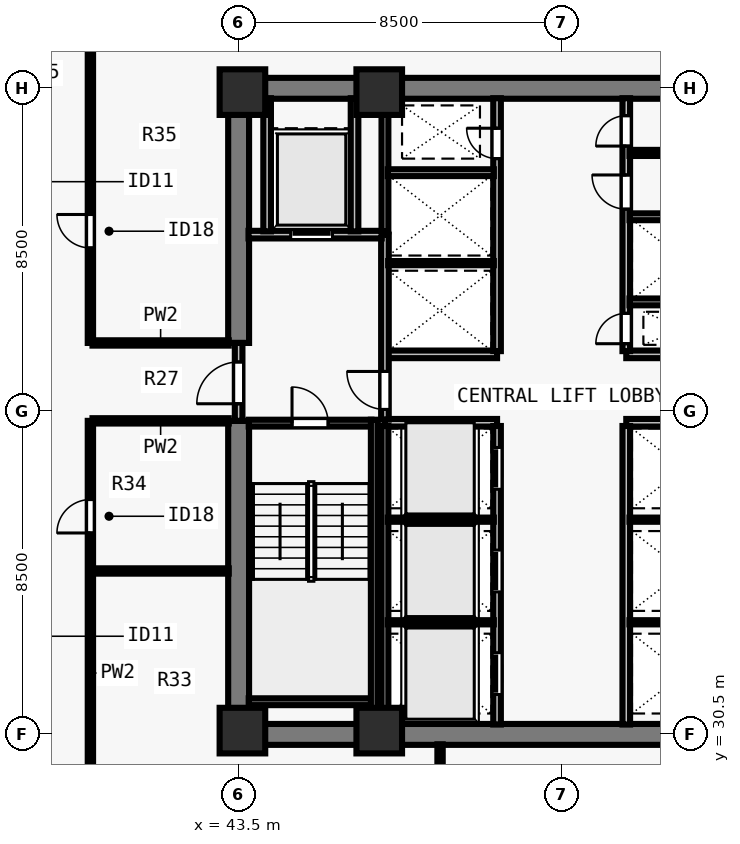
"""IFC4 building model, lengths in metres.
Left out: names, types, materials, properties, quantities, classifications, styles, units other than length and angle.
Written with IfcOpenShell. Run it as: python <this file> out.ifc"""

import sys

from ifc_helpers import new_model, si_unit, direction, frame, frame_2d, origin, origin_2d, place, context, subcontext, project, spatial, rectangle, extrude, element, fill, save


model = new_model("IFC4")
c1 = context("Model", 3, precision=1e-05, world=origin(), true_north=direction((0.0, 1.0)))
c2 = subcontext(c1, "Body", "Model", "MODEL_VIEW")
j1 = project(units=[si_unit("LENGTHUNIT", "METRE"), si_unit("PLANEANGLEUNIT", "RADIAN")], contexts=[c1])
p1 = place(None, origin())
s1 = spatial("IfcSite", under=j1, at=p1, CompositionType="ELEMENT")
p2 = place(p1, origin())
s2 = spatial("IfcBuilding", under=s1, at=p2, CompositionType="ELEMENT")
p3 = place(p2, frame((0.0, 0.0, 55.0)))
s3 = spatial("IfcBuildingStorey", under=s2, at=p3, CompositionType="ELEMENT", Elevation=55.0)
for number, where, z_axis, x_axis in (
    (1, (43.6, 30.6, 0.0), (0.0, 0.0, 1.0), (1.0, 0.0, 0.0)),
    (2, (47.2, 30.6, 0.0), (0.0, 0.0, 1.0), (1.0, 0.0, 0.0)),
    (3, (43.6, 47.4, 0.0), (0.0, 0.0, 1.0), (1.0, 0.0, 0.0)),
    (4, (47.2, 47.4, 0.0), (0.0, 0.0, 1.0), (1.0, 0.0, 0.0)),
):
    element("IfcColumn", number, at=place(p3, frame(where, z_axis=z_axis, x_axis=x_axis)), inside=s3, PredefinedType="COLUMN", context=c2, shape_type="SweptSolid", body=[
        extrude(rectangle(XDim=1.2, YDim=1.2, at=origin_2d()), origin(), (0.0, 0.0, 1.0), 3.5),
    ])
for number, where, z_axis, x_axis in (
    (5, (43.225, 30.5, 0.0), (0.0, 0.0, 1.0), (1.0, 0.0, 0.0)),
    (6, (43.225, 47.5, 0.0), (0.0, 0.0, 1.0), (1.0, 0.0, 0.0)),
):
    element("IfcWall", number, at=place(p3, frame(where, z_axis=z_axis, x_axis=x_axis)), inside=s3, PredefinedType="SHEAR", context=c2, shape_type="SweptSolid", body=[
        extrude(rectangle(XDim=17.55, YDim=0.55, at=frame_2d((8.775, 0.0))), origin(), (0.0, 0.0, 1.0), 3.28),
    ])
p4 = place(p3, frame((43.5, 30.765, 0.0), z_axis=(0.0, 0.0, 1.0), x_axis=(0.0, 1.0, 0.0)))
e7 = element("IfcWall", 7, at=p4, inside=s3, PredefinedType="SHEAR", context=c2, shape_type="SweptSolid", body=[
    extrude(rectangle(XDim=7.985, YDim=0.55, at=frame_2d((3.993, 0.0))), origin(), (0.0, 0.0, 1.0), 3.28),
])
p5 = place(p3, frame((43.5, 40.8, 0.0), z_axis=(0.0, 0.0, 1.0), x_axis=(0.0, 1.0, 0.0)))
e8 = element("IfcWall", 8, at=p5, inside=s3, PredefinedType="SHEAR", context=c2, shape_type="SweptSolid", body=[
    extrude(rectangle(XDim=6.435, YDim=0.55, at=frame_2d((3.218, 0.0))), origin(), (0.0, 0.0, 1.0), 3.28),
])
for number, where, z_axis, x_axis in (
    (9, (47.35, 38.7, 0.0), (0.0, 0.0, 1.0), (1.0, 0.0, 0.0)),
    (10, (47.35, 40.5, 0.0), (0.0, 0.0, 1.0), (1.0, 0.0, 0.0)),
    (11, (53.7, 38.7, 0.0), (0.0, 0.0, 1.0), (1.0, 0.0, 0.0)),
    (12, (53.7, 40.5, 0.0), (0.0, 0.0, 1.0), (1.0, 0.0, 0.0)),
):
    element("IfcWall", number, at=place(p3, frame(where, z_axis=z_axis, x_axis=x_axis)), inside=s3, PredefinedType="SOLIDWALL", context=c2, shape_type="SweptSolid", body=[
        extrude(rectangle(XDim=2.95, YDim=0.2, at=frame_2d((1.475, 0.0))), origin(), (0.0, 0.0, 1.0), 3.28),
    ])
p6 = place(p3, frame((50.3, 30.76, 0.0), z_axis=(0.0, 0.0, 1.0), x_axis=(0.0, 1.0, 0.0)))
e13 = element("IfcWall", 13, at=p6, inside=s3, PredefinedType="SOLIDWALL", context=c2, shape_type="SweptSolid", body=[
    extrude(rectangle(XDim=7.855, YDim=0.2, at=frame_2d((3.927, 0.0))), origin(), (0.0, 0.0, 1.0), 3.28),
])
p7 = place(p6, frame((0.79, 0.0, 0.0)))
e14 = element("IfcOpeningElement", 14, at=p7, cuts=e13, PredefinedType="OPENING", context=c2, shape_type="SweptSolid", body=[
    extrude(rectangle(XDim=1.1, YDim=2.2, at=frame_2d((0.55, 1.1))), frame((0.0, 0.11, 0.0), z_axis=(0.0, -1.0, 0.0), x_axis=(1.0, 0.0, 0.0)), (0.0, 0.0, 1.0), 0.22),
])
p8 = place(p6, frame((3.49, 0.0, 0.0)))
e15 = element("IfcOpeningElement", 15, at=p8, cuts=e13, PredefinedType="OPENING", context=c2, shape_type="SweptSolid", body=[
    extrude(rectangle(XDim=1.1, YDim=2.2, at=frame_2d((0.55, 1.1))), frame((0.0, 0.11, 0.0), z_axis=(0.0, -1.0, 0.0), x_axis=(1.0, 0.0, 0.0)), (0.0, 0.0, 1.0), 0.22),
])
p9 = place(p6, frame((6.19, 0.0, 0.0)))
e16 = element("IfcOpeningElement", 16, at=p9, cuts=e13, PredefinedType="OPENING", context=c2, shape_type="SweptSolid", body=[
    extrude(rectangle(XDim=1.1, YDim=2.2, at=frame_2d((0.55, 1.1))), frame((0.0, 0.11, 0.0), z_axis=(0.0, -1.0, 0.0), x_axis=(1.0, 0.0, 0.0)), (0.0, 0.0, 1.0), 0.22),
])
p10 = place(p3, frame((53.7, 30.76, 0.0), z_axis=(0.0, 0.0, 1.0), x_axis=(0.0, 1.0, 0.0)))
e17 = element("IfcWall", 17, at=p10, inside=s3, PredefinedType="SOLIDWALL", context=c2, shape_type="SweptSolid", body=[
    extrude(rectangle(XDim=7.855, YDim=0.2, at=frame_2d((3.927, 0.0))), origin(), (0.0, 0.0, 1.0), 3.28),
])
p11 = place(p3, frame((50.3, 40.585, 0.0), z_axis=(0.0, 0.0, 1.0), x_axis=(0.0, 1.0, 0.0)))
e18 = element("IfcWall", 18, at=p11, inside=s3, PredefinedType="SOLIDWALL", context=c2, shape_type="SweptSolid", body=[
    extrude(rectangle(XDim=6.655, YDim=0.2, at=frame_2d((3.328, 0.0))), origin(), (0.0, 0.0, 1.0), 3.28),
])
p12 = place(p11, frame((5.065, 0.0, 0.0)))
e19 = element("IfcOpeningElement", 19, at=p12, cuts=e18, PredefinedType="OPENING", context=c2, shape_type="SweptSolid", body=[
    extrude(rectangle(XDim=0.8, YDim=2.08, at=frame_2d((0.4, 1.04))), frame((0.0, 0.11, 0.0), z_axis=(0.0, -1.0, 0.0), x_axis=(1.0, 0.0, 0.0)), (0.0, 0.0, 1.0), 0.22),
])
p13 = place(p3, frame((53.7, 40.585, 0.0), z_axis=(0.0, 0.0, 1.0), x_axis=(0.0, 1.0, 0.0)))
e20 = element("IfcWall", 20, at=p13, inside=s3, PredefinedType="SOLIDWALL", context=c2, shape_type="SweptSolid", body=[
    extrude(rectangle(XDim=6.655, YDim=0.2, at=frame_2d((3.328, 0.0))), origin(), (0.0, 0.0, 1.0), 3.28),
])
p14 = place(p13, frame((0.195, 0.0, 0.0)))
e21 = element("IfcOpeningElement", 21, at=p14, cuts=e20, PredefinedType="OPENING", context=c2, shape_type="SweptSolid", body=[
    extrude(rectangle(XDim=0.8, YDim=2.08, at=frame_2d((0.4, 1.04))), frame((0.0, 0.11, 0.0), z_axis=(0.0, -1.0, 0.0), x_axis=(1.0, 0.0, 0.0)), (0.0, 0.0, 1.0), 0.22),
])
p15 = place(p13, frame((3.735, 0.0, 0.0)))
e22 = element("IfcOpeningElement", 22, at=p15, cuts=e20, PredefinedType="OPENING", context=c2, shape_type="SweptSolid", body=[
    extrude(rectangle(XDim=0.9, YDim=2.12, at=frame_2d((0.45, 1.06))), frame((0.0, 0.11, 0.0), z_axis=(0.0, -1.0, 0.0), x_axis=(1.0, 0.0, 0.0)), (0.0, 0.0, 1.0), 0.22),
])
p16 = place(p13, frame((5.395, 0.0, 0.0)))
e23 = element("IfcOpeningElement", 23, at=p16, cuts=e20, PredefinedType="OPENING", context=c2, shape_type="SweptSolid", body=[
    extrude(rectangle(XDim=0.8, YDim=2.1, at=frame_2d((0.4, 1.05))), frame((0.0, 0.11, 0.0), z_axis=(0.0, -1.0, 0.0), x_axis=(1.0, 0.0, 0.0)), (0.0, 0.0, 1.0), 0.22),
])
p17 = place(p3, frame((43.5, 38.75, 0.0), z_axis=(0.0, 0.0, 1.0), x_axis=(0.0, 1.0, 0.0)))
e24 = element("IfcWall", 24, at=p17, inside=s3, PredefinedType="SOLIDWALL", context=c2, shape_type="SweptSolid", body=[
    extrude(rectangle(XDim=2.05, YDim=0.2, at=frame_2d((1.025, 0.0))), origin(), (0.0, 0.0, 1.0), 3.28),
])
p18 = place(p17, frame((0.45, 0.0, 0.0)))
e25 = element("IfcOpeningElement", 25, at=p18, cuts=e24, PredefinedType="OPENING", context=c2, shape_type="SweptSolid", body=[
    extrude(rectangle(XDim=1.1, YDim=2.15, at=frame_2d((0.55, 1.075))), frame((0.0, 0.11, 0.0), z_axis=(0.0, -1.0, 0.0), x_axis=(1.0, 0.0, 0.0)), (0.0, 0.0, 1.0), 0.22),
])
p19 = place(p3, frame((47.35, 38.785, 0.0), z_axis=(0.0, 0.0, 1.0), x_axis=(0.0, 1.0, 0.0)))
e26 = element("IfcWall", 26, at=p19, inside=s3, PredefinedType="SOLIDWALL", context=c2, shape_type="SweptSolid", body=[
    extrude(rectangle(XDim=4.865, YDim=0.2, at=frame_2d((2.433, 0.0))), origin(), (0.0, 0.0, 1.0), 3.28),
])
p20 = place(p19, frame((0.265, 0.0, 0.0)))
e27 = element("IfcOpeningElement", 27, at=p20, cuts=e26, PredefinedType="OPENING", context=c2, shape_type="SweptSolid", body=[
    extrude(rectangle(XDim=1.0, YDim=2.15, at=frame_2d((0.5, 1.075))), frame((0.0, 0.11, 0.0), z_axis=(0.0, -1.0, 0.0), x_axis=(1.0, 0.0, 0.0)), (0.0, 0.0, 1.0), 0.22),
])
p21 = place(p3, frame((43.76, 43.65, 0.0), z_axis=(0.0, 0.0, 1.0), x_axis=(1.0, 0.0, 0.0)))
e28 = element("IfcWall", 28, at=p21, inside=s3, PredefinedType="SOLIDWALL", context=c2, shape_type="SweptSolid", body=[
    extrude(rectangle(XDim=3.505, YDim=0.2, at=frame_2d((1.752, 0.0))), origin(), (0.0, 0.0, 1.0), 3.28),
])
p22 = place(p21, frame((1.11, 0.0, 0.0)))
e29 = element("IfcOpeningElement", 29, at=p22, cuts=e28, PredefinedType="OPENING", context=c2, shape_type="SweptSolid", body=[
    extrude(rectangle(XDim=1.1, YDim=2.2, at=frame_2d((0.55, 1.1))), frame((0.0, 0.11, 0.0), z_axis=(0.0, -1.0, 0.0), x_axis=(1.0, 0.0, 0.0)), (0.0, 0.0, 1.0), 0.22),
])
for number, where, z_axis, x_axis in (
    (30, (46.55, 43.735, 0.0), (0.0, 0.0, 1.0), (0.0, 1.0, 0.0)),
    (31, (44.25, 43.735, 0.0), (0.0, 0.0, 1.0), (0.0, 1.0, 0.0)),
):
    element("IfcWall", number, at=place(p3, frame(where, z_axis=z_axis, x_axis=x_axis)), inside=s3, PredefinedType="SOLIDWALL", context=c2, shape_type="SweptSolid", body=[
        extrude(rectangle(XDim=3.505, YDim=0.2, at=frame_2d((1.752, 0.0))), origin(), (0.0, 0.0, 1.0), 3.28),
    ])
p23 = place(p3, frame((47.35, 30.76, 0.0), z_axis=(0.0, 0.0, 1.0), x_axis=(0.0, 1.0, 0.0)))
e32 = element("IfcWall", 32, at=p23, inside=s3, PredefinedType="SOLIDWALL", context=c2, shape_type="SweptSolid", body=[
    extrude(rectangle(XDim=7.855, YDim=0.18, at=frame_2d((3.927, 0.0))), origin(), (0.0, 0.0, 1.0), 3.28),
])
for number, where, z_axis, x_axis in (
    (33, (47.425, 33.45, 0.0), (0.0, 0.0, 1.0), (1.0, 0.0, 0.0)),
    (34, (47.425, 36.15, 0.0), (0.0, 0.0, 1.0), (1.0, 0.0, 0.0)),
    (35, (53.785, 33.45, 0.0), (0.0, 0.0, 1.0), (1.0, 0.0, 0.0)),
    (36, (53.785, 36.15, 0.0), (0.0, 0.0, 1.0), (1.0, 0.0, 0.0)),
):
    element("IfcWall", number, at=place(p3, frame(where, z_axis=z_axis, x_axis=x_axis)), inside=s3, PredefinedType="PARTITIONING", context=c2, shape_type="SweptSolid", body=[
        extrude(rectangle(XDim=2.79, YDim=0.11, at=frame_2d((1.395, 0.0))), origin(), (0.0, 0.0, 1.0), 3.28),
    ])
p24 = place(p3, frame((47.35, 43.735, 0.0), z_axis=(0.0, 0.0, 1.0), x_axis=(0.0, 1.0, 0.0)))
e37 = element("IfcWall", 37, at=p24, inside=s3, PredefinedType="SOLIDWALL", context=c2, shape_type="SweptSolid", body=[
    extrude(rectangle(XDim=3.505, YDim=0.18, at=frame_2d((1.752, 0.0))), origin(), (0.0, 0.0, 1.0), 3.28),
])
p25 = place(p3, frame((47.435, 42.9, 0.0), z_axis=(0.0, 0.0, 1.0), x_axis=(1.0, 0.0, 0.0)))
e38 = element("IfcWall", 38, at=p25, inside=s3, PredefinedType="PARTITIONING", context=c2, shape_type="SweptSolid", body=[
    extrude(rectangle(XDim=2.78, YDim=0.11, at=frame_2d((1.39, 0.0))), origin(), (0.0, 0.0, 1.0), 3.28),
])
p26 = place(p3, frame((47.425, 45.28, 0.0), z_axis=(0.0, 0.0, 1.0), x_axis=(1.0, 0.0, 0.0)))
e39 = element("IfcWall", 39, at=p26, inside=s3, PredefinedType="SOLIDWALL", context=c2, shape_type="SweptSolid", body=[
    extrude(rectangle(XDim=2.79, YDim=0.18, at=frame_2d((1.395, 0.0))), origin(), (0.0, 0.0, 1.0), 3.28),
])
p27 = place(p3, frame((53.785, 41.88, 0.0), z_axis=(0.0, 0.0, 1.0), x_axis=(1.0, 0.0, 0.0)))
e40 = element("IfcWall", 40, at=p27, inside=s3, PredefinedType="SOLIDWALL", context=c2, shape_type="SweptSolid", body=[
    extrude(rectangle(XDim=2.78, YDim=0.18, at=frame_2d((1.39, 0.0))), origin(), (0.0, 0.0, 1.0), 3.28),
])
p28 = place(p3, frame((53.785, 44.12, 0.0), z_axis=(0.0, 0.0, 1.0), x_axis=(1.0, 0.0, 0.0)))
e41 = element("IfcWall", 41, at=p28, inside=s3, PredefinedType="SOLIDWALL", context=c2, shape_type="SweptSolid", body=[
    extrude(rectangle(XDim=2.79, YDim=0.18, at=frame_2d((1.395, 0.0))), origin(), (0.0, 0.0, 1.0), 3.28),
])
p29 = place(p3, frame((53.785, 45.8, 0.0), z_axis=(0.0, 0.0, 1.0), x_axis=(1.0, 0.0, 0.0)))
e42 = element("IfcWall", 42, at=p29, inside=s3, PredefinedType="PARTITIONING", context=c2, shape_type="SweptSolid", body=[
    extrude(rectangle(XDim=2.79, YDim=0.16, at=frame_2d((1.395, 0.0))), origin(), (0.0, 0.0, 1.0), 3.28),
])
p30 = place(p3, frame((39.6, 26.505, 0.0), z_axis=(0.0, 0.0, 1.0), x_axis=(0.0, 1.0, 0.0)))
e43 = element("IfcWall", 43, at=p30, inside=s3, PredefinedType="PARTITIONING", context=c2, shape_type="SweptSolid", body=[
    extrude(rectangle(XDim=12.245, YDim=0.14, at=frame_2d((6.123, 0.0))), origin(), (0.0, 0.0, 1.0), 3.28),
])
p31 = place(p30, frame((1.045, 0.0, 0.0)))
e44 = element("IfcOpeningElement", 44, at=p31, cuts=e43, PredefinedType="OPENING", context=c2, shape_type="SweptSolid", body=[
    extrude(rectangle(XDim=0.88, YDim=2.1, at=frame_2d((0.44, 1.05))), frame((0.0, 0.08, 0.0), z_axis=(0.0, -1.0, 0.0), x_axis=(1.0, 0.0, 0.0)), (0.0, 0.0, 1.0), 0.16),
])
p32 = place(p30, frame((9.295, 0.0, 0.0)))
e45 = element("IfcOpeningElement", 45, at=p32, cuts=e43, PredefinedType="OPENING", context=c2, shape_type="SweptSolid", body=[
    extrude(rectangle(XDim=0.88, YDim=2.1, at=frame_2d((0.44, 1.05))), frame((0.0, 0.08, 0.0), z_axis=(0.0, -1.0, 0.0), x_axis=(1.0, 0.0, 0.0)), (0.0, 0.0, 1.0), 0.16),
])
p33 = place(p3, frame((39.6, 40.8, 0.0), z_axis=(0.0, 0.0, 1.0), x_axis=(0.0, 1.0, 0.0)))
e46 = element("IfcWall", 46, at=p33, inside=s3, PredefinedType="PARTITIONING", context=c2, shape_type="SweptSolid", body=[
    extrude(rectangle(XDim=10.695, YDim=0.14, at=frame_2d((5.348, 0.0))), origin(), (0.0, 0.0, 1.0), 3.28),
])
p34 = place(p33, frame((2.5, 0.0, 0.0)))
e47 = element("IfcOpeningElement", 47, at=p34, cuts=e46, PredefinedType="OPENING", context=c2, shape_type="SweptSolid", body=[
    extrude(rectangle(XDim=0.88, YDim=2.1, at=frame_2d((0.44, 1.05))), frame((0.0, 0.08, 0.0), z_axis=(0.0, -1.0, 0.0), x_axis=(1.0, 0.0, 0.0)), (0.0, 0.0, 1.0), 0.16),
])
for number, where, z_axis, x_axis in (
    (48, (39.655, 38.75, 0.0), (0.0, 0.0, 1.0), (1.0, 0.0, 0.0)),
    (49, (39.655, 40.8, 0.0), (0.0, 0.0, 1.0), (1.0, 0.0, 0.0)),
):
    element("IfcWall", number, at=place(p3, frame(where, z_axis=z_axis, x_axis=x_axis)), inside=s3, PredefinedType="PARTITIONING", context=c2, shape_type="SweptSolid", body=[
        extrude(rectangle(XDim=3.585, YDim=0.14, at=frame_2d((1.792, 0.0))), origin(), (0.0, 0.0, 1.0), 3.28),
    ])
p35 = place(p3, frame((48.8, 26.505, 0.0), z_axis=(0.0, 0.0, 1.0), x_axis=(0.0, 1.0, 0.0)))
e50 = element("IfcWall", 50, at=p35, inside=s3, PredefinedType="PARTITIONING", context=c2, shape_type="SweptSolid", body=[
    extrude(rectangle(XDim=3.735, YDim=0.14, at=frame_2d((1.868, 0.0))), origin(), (0.0, 0.0, 1.0), 3.28),
])
p36 = place(p3, frame((39.655, 34.8, 0.0), z_axis=(0.0, 0.0, 1.0), x_axis=(1.0, 0.0, 0.0)))
e51 = element("IfcWall", 51, at=p36, inside=s3, PredefinedType="PARTITIONING", context=c2, shape_type="SweptSolid", body=[
    extrude(rectangle(XDim=3.585, YDim=0.14, at=frame_2d((1.792, 0.0))), origin(), (0.0, 0.0, 1.0), 3.28),
])
p37 = place(p3, frame((43.765, 38.69, 0.0), z_axis=(0.0, 0.0, 1.0), x_axis=(1.0, 0.0, 0.0)))
e52 = element("IfcWall", 52, at=p37, inside=s3, PredefinedType="SOLIDWALL", context=c2, shape_type="SweptSolid", body=[
    extrude(rectangle(XDim=3.23, YDim=0.18, at=frame_2d((1.615, 0.0))), origin(), (0.0, 0.0, 1.0), 3.28),
])
p38 = place(p37, frame((1.14, 0.0, 0.0)))
e53 = element("IfcOpeningElement", 53, at=p38, cuts=e52, PredefinedType="OPENING", context=c2, shape_type="SweptSolid", body=[
    extrude(rectangle(XDim=0.95, YDim=2.15, at=frame_2d((0.475, 1.075))), frame((0.0, 0.1, 0.0), z_axis=(0.0, -1.0, 0.0), x_axis=(1.0, 0.0, 0.0)), (0.0, 0.0, 1.0), 0.2),
])
p39 = place(p3, frame((43.765, 31.36, 0.0), z_axis=(0.0, 0.0, 1.0), x_axis=(1.0, 0.0, 0.0)))
e54 = element("IfcWall", 54, at=p39, inside=s3, PredefinedType="SOLIDWALL", context=c2, shape_type="SweptSolid", body=[
    extrude(rectangle(XDim=3.23, YDim=0.18, at=frame_2d((1.615, 0.0))), origin(), (0.0, 0.0, 1.0), 3.28),
])
p40 = place(p3, frame((47.07, 38.78, 0.0), z_axis=(0.0, 0.0, 1.0), x_axis=(0.0, -1.0, 0.0)))
e55 = element("IfcWall", 55, at=p40, inside=s3, PredefinedType="SOLIDWALL", context=c2, shape_type="SweptSolid", body=[
    extrude(rectangle(XDim=8.017, YDim=0.18, at=frame_2d((4.009, 0.0))), origin(), (0.0, 0.0, 1.0), 3.28),
])
p41 = place(p18, origin())
e56 = element("IfcDoor", 56, at=p41, inside=s3, OperationType="SINGLE_SWING_LEFT", PredefinedType="DOOR", context=c2, shape_type="SweptSolid", body=[
    extrude(rectangle(XDim=1.1, YDim=2.15, at=frame_2d((0.55, 1.075))), frame((0.0, 0.025, 0.0), z_axis=(0.0, -1.0, 0.0), x_axis=(1.0, 0.0, 0.0)), (0.0, 0.0, 1.0), 0.05),
])
fill(e25, e56)
p42 = place(p20, origin())
e57 = element("IfcDoor", 57, at=p42, inside=s3, OperationType="SINGLE_SWING_RIGHT", PredefinedType="DOOR", context=c2, shape_type="SweptSolid", body=[
    extrude(rectangle(XDim=1.0, YDim=2.15, at=frame_2d((0.5, 1.075))), frame((0.0, 0.025, 0.0), z_axis=(0.0, -1.0, 0.0), x_axis=(1.0, 0.0, 0.0)), (0.0, 0.0, 1.0), 0.05),
])
fill(e27, e57)
p43 = place(p22, origin())
e58 = element("IfcDoor", 58, at=p43, inside=s3, OperationType="SLIDING_TO_LEFT", PredefinedType="DOOR", context=c2, shape_type="SweptSolid", body=[
    extrude(rectangle(XDim=1.1, YDim=2.2, at=frame_2d((0.55, 1.1))), frame((0.0, 0.025, 0.0), z_axis=(0.0, -1.0, 0.0), x_axis=(1.0, 0.0, 0.0)), (0.0, 0.0, 1.0), 0.05),
])
fill(e29, e58)
p44 = place(p7, origin())
e59 = element("IfcDoor", 59, at=p44, inside=s3, OperationType="SLIDING_TO_LEFT", PredefinedType="DOOR", context=c2, shape_type="SweptSolid", body=[
    extrude(rectangle(XDim=1.1, YDim=2.2, at=frame_2d((0.55, 1.1))), frame((0.0, 0.025, 0.0), z_axis=(0.0, -1.0, 0.0), x_axis=(1.0, 0.0, 0.0)), (0.0, 0.0, 1.0), 0.05),
])
fill(e14, e59)
p45 = place(p8, origin())
e60 = element("IfcDoor", 60, at=p45, inside=s3, OperationType="SLIDING_TO_LEFT", PredefinedType="DOOR", context=c2, shape_type="SweptSolid", body=[
    extrude(rectangle(XDim=1.1, YDim=2.2, at=frame_2d((0.55, 1.1))), frame((0.0, 0.025, 0.0), z_axis=(0.0, -1.0, 0.0), x_axis=(1.0, 0.0, 0.0)), (0.0, 0.0, 1.0), 0.05),
])
fill(e15, e60)
p46 = place(p9, origin())
e61 = element("IfcDoor", 61, at=p46, inside=s3, OperationType="SLIDING_TO_LEFT", PredefinedType="DOOR", context=c2, shape_type="SweptSolid", body=[
    extrude(rectangle(XDim=1.1, YDim=2.2, at=frame_2d((0.55, 1.1))), frame((0.0, 0.025, 0.0), z_axis=(0.0, -1.0, 0.0), x_axis=(1.0, 0.0, 0.0)), (0.0, 0.0, 1.0), 0.05),
])
fill(e16, e61)
p47 = place(p12, origin())
e62 = element("IfcDoor", 62, at=p47, inside=s3, OperationType="SINGLE_SWING_RIGHT", PredefinedType="DOOR", context=c2, shape_type="SweptSolid", body=[
    extrude(rectangle(XDim=0.8, YDim=2.08, at=frame_2d((0.4, 1.04))), frame((0.0, 0.025, 0.0), z_axis=(0.0, -1.0, 0.0), x_axis=(1.0, 0.0, 0.0)), (0.0, 0.0, 1.0), 0.05),
])
fill(e19, e62)
p48 = place(p14, origin())
e63 = element("IfcDoor", 63, at=p48, inside=s3, OperationType="SINGLE_SWING_LEFT", PredefinedType="DOOR", context=c2, shape_type="SweptSolid", body=[
    extrude(rectangle(XDim=0.8, YDim=2.08, at=frame_2d((0.4, 1.04))), frame((0.0, 0.025, 0.0), z_axis=(0.0, -1.0, 0.0), x_axis=(1.0, 0.0, 0.0)), (0.0, 0.0, 1.0), 0.05),
])
fill(e21, e63)
p49 = place(p15, origin())
e64 = element("IfcDoor", 64, at=p49, inside=s3, OperationType="SINGLE_SWING_RIGHT", PredefinedType="DOOR", context=c2, shape_type="SweptSolid", body=[
    extrude(rectangle(XDim=0.9, YDim=2.12, at=frame_2d((0.45, 1.06))), frame((0.0, 0.025, 0.0), z_axis=(0.0, -1.0, 0.0), x_axis=(1.0, 0.0, 0.0)), (0.0, 0.0, 1.0), 0.05),
])
fill(e22, e64)
p50 = place(p16, origin())
e65 = element("IfcDoor", 65, at=p50, inside=s3, OperationType="SINGLE_SWING_LEFT", PredefinedType="DOOR", context=c2, shape_type="SweptSolid", body=[
    extrude(rectangle(XDim=0.8, YDim=2.1, at=frame_2d((0.4, 1.05))), frame((0.0, 0.025, 0.0), z_axis=(0.0, -1.0, 0.0), x_axis=(1.0, 0.0, 0.0)), (0.0, 0.0, 1.0), 0.05),
])
fill(e23, e65)
p51 = place(p32, origin())
e66 = element("IfcDoor", 66, at=p51, inside=s3, OperationType="SINGLE_SWING_LEFT", PredefinedType="DOOR", context=c2, shape_type="SweptSolid", body=[
    extrude(rectangle(XDim=0.88, YDim=2.1, at=frame_2d((0.44, 1.05))), frame((0.0, 0.025, 0.0), z_axis=(0.0, -1.0, 0.0), x_axis=(1.0, 0.0, 0.0)), (0.0, 0.0, 1.0), 0.05),
])
fill(e45, e66)
p52 = place(p34, origin())
e67 = element("IfcDoor", 67, at=p52, inside=s3, OperationType="SINGLE_SWING_RIGHT", PredefinedType="DOOR", context=c2, shape_type="SweptSolid", body=[
    extrude(rectangle(XDim=0.88, YDim=2.1, at=frame_2d((0.44, 1.05))), frame((0.0, 0.025, 0.0), z_axis=(0.0, -1.0, 0.0), x_axis=(1.0, 0.0, 0.0)), (0.0, 0.0, 1.0), 0.05),
])
fill(e47, e67)
p53 = place(p38, origin())
e68 = element("IfcDoor", 68, at=p53, inside=s3, OperationType="SINGLE_SWING_LEFT", PredefinedType="DOOR", context=c2, shape_type="SweptSolid", body=[
    extrude(rectangle(XDim=0.95, YDim=2.15, at=frame_2d((0.475, 1.075))), frame((0.0, 0.025, 0.0), z_axis=(0.0, -1.0, 0.0), x_axis=(1.0, 0.0, 0.0)), (0.0, 0.0, 1.0), 0.05),
])
fill(e53, e68)
save(model, sys.argv[1])
